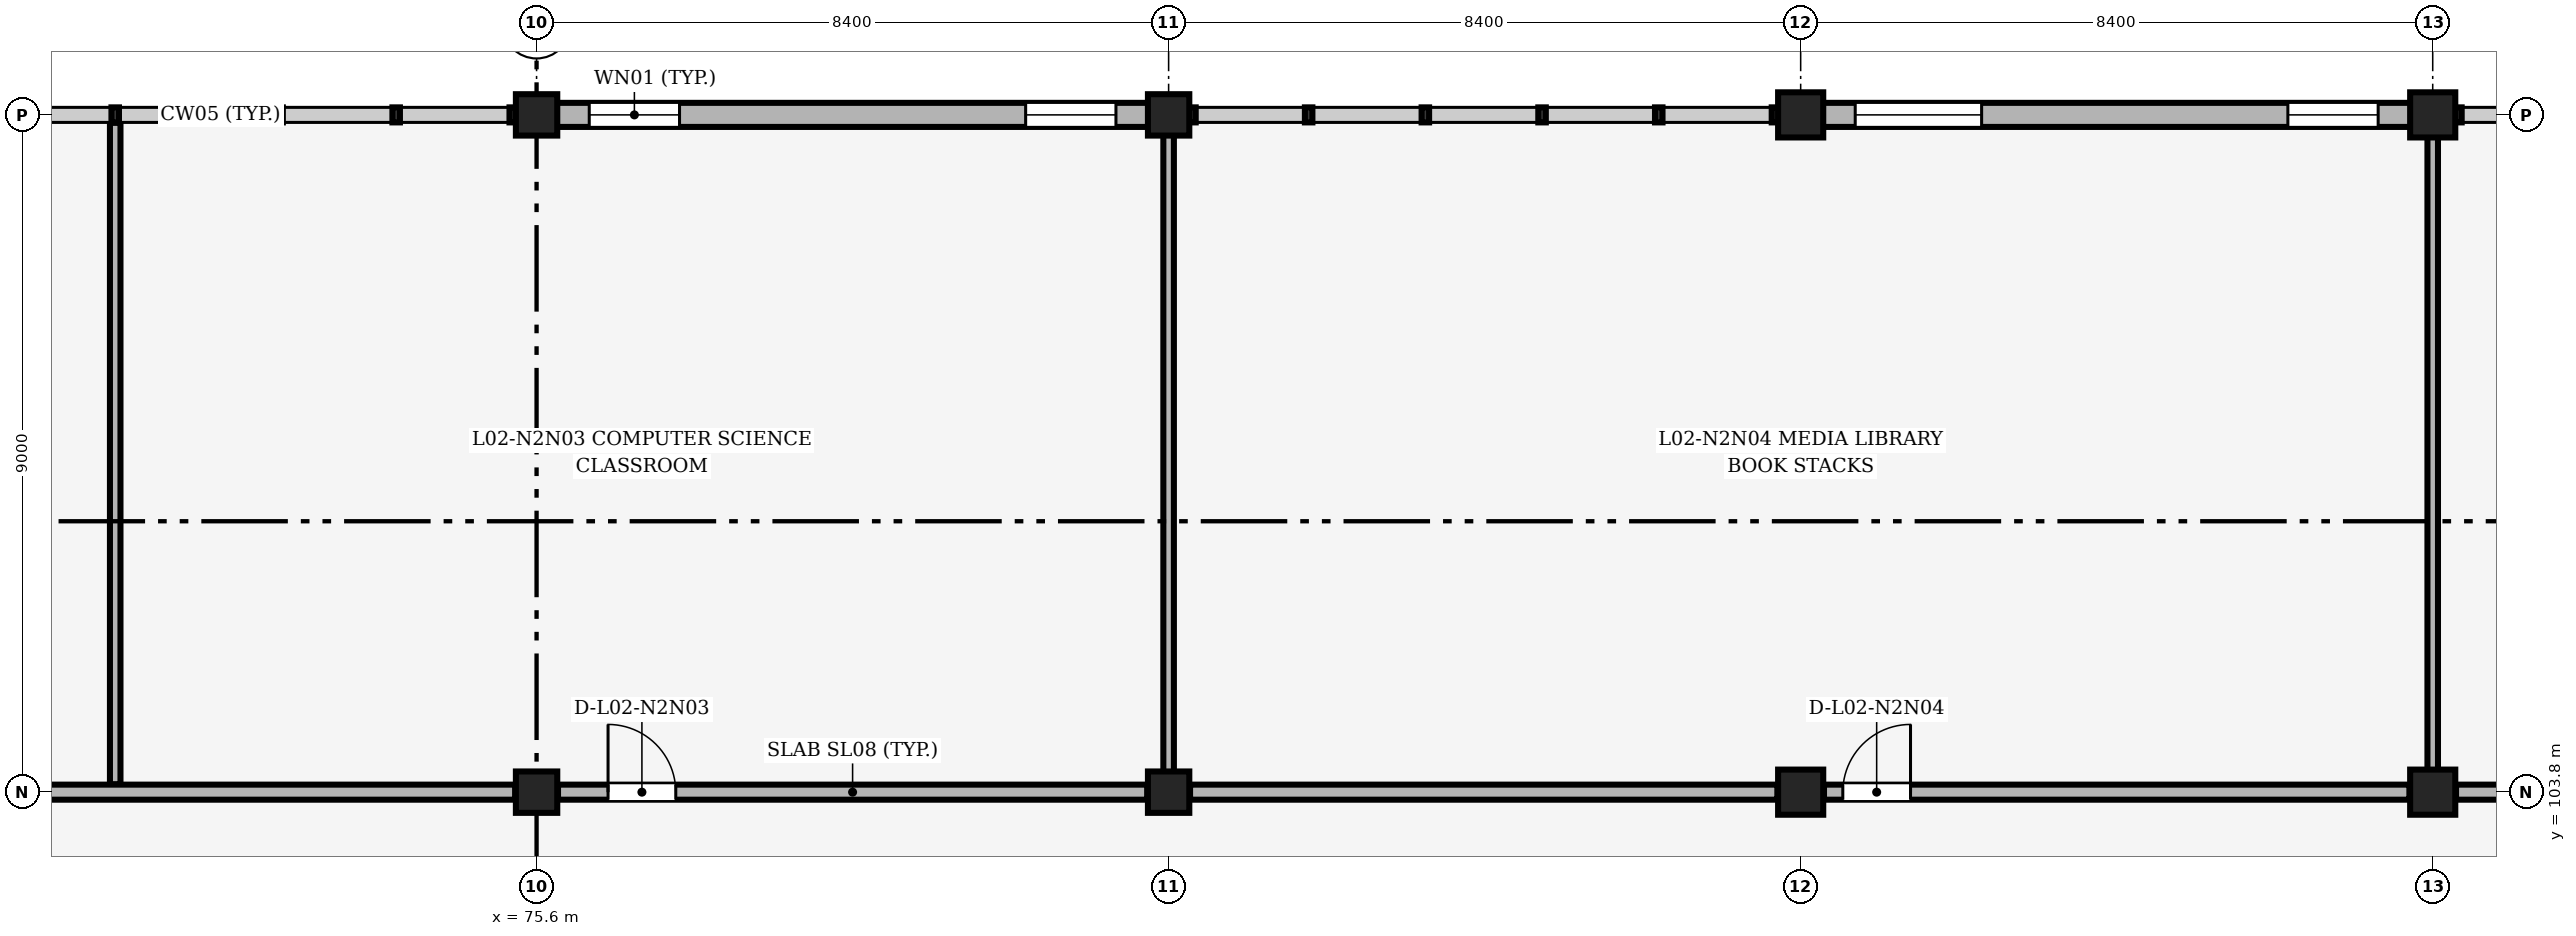
"""IFC4 building model, lengths in metres.
Left out: names, types, materials, properties, quantities, classifications, styles, units other than length and angle.
Written with IfcOpenShell. Run it as: python <this file> out.ifc"""

import sys

from ifc_helpers import new_model, si_unit, direction, frame, frame_2d, origin, origin_2d, place, context, subcontext, project, spatial, rectangle, extrude, element, fill, save


model = new_model("IFC4")
c1 = context("Model", 3, precision=1e-05, world=origin(), true_north=direction((0.0, 1.0)))
c2 = subcontext(c1, "Body", "Model", "MODEL_VIEW")
j1 = project(units=[si_unit("LENGTHUNIT", "METRE"), si_unit("PLANEANGLEUNIT", "RADIAN")], contexts=[c1])
p1 = place(None, origin())
s1 = spatial("IfcSite", under=j1, at=p1, CompositionType="ELEMENT")
p2 = place(p1, origin())
s2 = spatial("IfcBuilding", under=s1, at=p2, CompositionType="ELEMENT")
p3 = place(p2, frame((0.0, 0.0, 9.0)))
s3 = spatial("IfcBuildingStorey", under=s2, at=p3, CompositionType="ELEMENT", Elevation=9.0)
for number, where, z_axis, x_axis in (
    (1, (75.6, 103.8, 0.0), (0.0, 0.0, 1.0), (1.0, 0.0, 0.0)),
    (2, (75.6, 112.8, 0.0), (0.0, 0.0, 1.0), (1.0, 0.0, 0.0)),
    (3, (84.0, 103.8, 0.0), (0.0, 0.0, 1.0), (1.0, 0.0, 0.0)),
    (4, (84.0, 112.8, 0.0), (0.0, 0.0, 1.0), (1.0, 0.0, 0.0)),
):
    element("IfcColumn", number, at=place(p3, frame(where, z_axis=z_axis, x_axis=x_axis)), inside=s3, PredefinedType="COLUMN", context=c2, shape_type="SweptSolid", body=[
        extrude(rectangle(XDim=0.55, YDim=0.55, at=origin_2d()), origin(), (0.0, 0.0, 1.0), 4.2),
    ])
for number, where, z_axis, x_axis in (
    (5, (92.4, 103.8, 0.0), (0.0, 0.0, 1.0), (1.0, 0.0, 0.0)),
    (6, (92.4, 112.8, 0.0), (0.0, 0.0, 1.0), (1.0, 0.0, 0.0)),
    (7, (100.8, 103.8, 0.0), (0.0, 0.0, 1.0), (1.0, 0.0, 0.0)),
    (8, (100.8, 112.8, 0.0), (0.0, 0.0, 1.0), (1.0, 0.0, 0.0)),
):
    element("IfcColumn", number, at=place(p3, frame(where, z_axis=z_axis, x_axis=x_axis)), inside=s3, PredefinedType="COLUMN", context=c2, shape_type="SweptSolid", body=[
        extrude(rectangle(XDim=0.6, YDim=0.6, at=origin_2d()), origin(), (0.0, 0.0, 1.0), 4.2),
    ])
p4 = place(p3, frame((75.85, 112.8, 0.0), z_axis=(0.0, 0.0, 1.0), x_axis=(1.0, 0.0, 0.0)))
e9 = element("IfcWall", 9, at=p4, inside=s3, PredefinedType="SOLIDWALL", context=c2, shape_type="SweptSolid", body=[
    extrude(rectangle(XDim=7.9, YDim=0.32, at=frame_2d((3.95, 0.0))), origin(), (0.0, 0.0, 1.0), 3.26),
])
p5 = place(p4, frame((0.45, 0.0, 0.9)))
e10 = element("IfcOpeningElement", 10, at=p5, cuts=e9, PredefinedType="OPENING", context=c2, shape_type="SweptSolid", body=[
    extrude(rectangle(XDim=1.2, YDim=1.5, at=frame_2d((0.6, 0.75))), frame((0.0, 0.17, 0.0), z_axis=(0.0, -1.0, 0.0), x_axis=(1.0, 0.0, 0.0)), (0.0, 0.0, 1.0), 0.34),
])
p6 = place(p4, frame((6.25, 0.0, 0.9)))
e11 = element("IfcOpeningElement", 11, at=p6, cuts=e9, PredefinedType="OPENING", context=c2, shape_type="SweptSolid", body=[
    extrude(rectangle(XDim=1.2, YDim=1.8, at=frame_2d((0.6, 0.9))), frame((0.0, 0.17, 0.0), z_axis=(0.0, -1.0, 0.0), x_axis=(1.0, 0.0, 0.0)), (0.0, 0.0, 1.0), 0.34),
])
p7 = place(p3, frame((92.675, 112.8, 0.0), z_axis=(0.0, 0.0, 1.0), x_axis=(1.0, 0.0, 0.0)))
e12 = element("IfcWall", 12, at=p7, inside=s3, PredefinedType="SOLIDWALL", context=c2, shape_type="SweptSolid", body=[
    extrude(rectangle(XDim=7.85, YDim=0.32, at=frame_2d((3.925, 0.0))), origin(), (0.0, 0.0, 1.0), 3.26),
])
p8 = place(p7, frame((0.45, 0.0, 0.9)))
e13 = element("IfcOpeningElement", 13, at=p8, cuts=e12, PredefinedType="OPENING", context=c2, shape_type="SweptSolid", body=[
    extrude(rectangle(XDim=1.68, YDim=2.21, at=frame_2d((0.84, 1.105))), frame((0.0, 0.17, 0.0), z_axis=(0.0, -1.0, 0.0), x_axis=(1.0, 0.0, 0.0)), (0.0, 0.0, 1.0), 0.34),
])
p9 = place(p7, frame((6.2, 0.0, 0.9)))
e14 = element("IfcOpeningElement", 14, at=p9, cuts=e12, PredefinedType="OPENING", context=c2, shape_type="SweptSolid", body=[
    extrude(rectangle(XDim=1.2, YDim=1.5, at=frame_2d((0.6, 0.75))), frame((0.0, 0.17, 0.0), z_axis=(0.0, -1.0, 0.0), x_axis=(1.0, 0.0, 0.0)), (0.0, 0.0, 1.0), 0.34),
])
p10 = place(p3, frame((70.0, 103.905, 0.0), z_axis=(0.0, 0.0, 1.0), x_axis=(0.0, 1.0, 0.0)))
e15 = element("IfcWall", 15, at=p10, inside=s3, PredefinedType="PARTITIONING", context=c2, shape_type="SweptSolid", body=[
    extrude(rectangle(XDim=8.79, YDim=0.14, at=frame_2d((4.395, 0.0))), origin(), (0.0, 0.0, 1.0), 3.9),
])
p11 = place(p3, frame((84.0, 103.905, 0.0), z_axis=(0.0, 0.0, 1.0), x_axis=(0.0, 1.0, 0.0)))
e16 = element("IfcWall", 16, at=p11, inside=s3, PredefinedType="PARTITIONING", context=c2, shape_type="SweptSolid", body=[
    extrude(rectangle(XDim=8.73, YDim=0.14, at=frame_2d((4.365, 0.0))), origin(), (0.0, 0.0, 1.0), 3.11),
])
p12 = place(p3, frame((100.8, 103.905, 0.0), z_axis=(0.0, 0.0, 1.0), x_axis=(0.0, 1.0, 0.0)))
e17 = element("IfcWall", 17, at=p12, inside=s3, PredefinedType="PARTITIONING", context=c2, shape_type="SweptSolid", body=[
    extrude(rectangle(XDim=8.73, YDim=0.14, at=frame_2d((4.365, 0.0))), origin(), (0.0, 0.0, 1.0), 2.96),
])
p13 = place(p3, frame((67.485, 103.8, 0.0), z_axis=(0.0, 0.0, 1.0), x_axis=(1.0, 0.0, 0.0)))
e18 = element("IfcWall", 18, at=p13, inside=s3, PredefinedType="PARTITIONING", context=c2, shape_type="SweptSolid", body=[
    extrude(rectangle(XDim=7.83, YDim=0.2, at=frame_2d((3.915, 0.0))), origin(), (0.0, 0.0, 1.0), 3.11),
])
p14 = place(p3, frame((75.885, 103.8, 0.0), z_axis=(0.0, 0.0, 1.0), x_axis=(1.0, 0.0, 0.0)))
e19 = element("IfcWall", 19, at=p14, inside=s3, PredefinedType="PARTITIONING", context=c2, shape_type="SweptSolid", body=[
    extrude(rectangle(XDim=7.83, YDim=0.2, at=frame_2d((3.915, 0.0))), origin(), (0.0, 0.0, 1.0), 3.06),
])
p15 = place(p14, frame((0.665, 0.0, 0.0)))
e20 = element("IfcOpeningElement", 20, at=p15, cuts=e19, PredefinedType="OPENING", context=c2, shape_type="SweptSolid", body=[
    extrude(rectangle(XDim=0.9, YDim=2.1, at=frame_2d((0.45, 1.05))), frame((0.0, 0.11, 0.0), z_axis=(0.0, -1.0, 0.0), x_axis=(1.0, 0.0, 0.0)), (0.0, 0.0, 1.0), 0.22),
])
p16 = place(p3, frame((84.285, 103.8, 0.0), z_axis=(0.0, 0.0, 1.0), x_axis=(1.0, 0.0, 0.0)))
e21 = element("IfcWall", 21, at=p16, inside=s3, PredefinedType="PARTITIONING", context=c2, shape_type="SweptSolid", body=[
    extrude(rectangle(XDim=7.805, YDim=0.2, at=frame_2d((3.903, 0.0))), origin(), (0.0, 0.0, 1.0), 3.01),
])
p17 = place(p3, frame((92.71, 103.8, 0.0), z_axis=(0.0, 0.0, 1.0), x_axis=(1.0, 0.0, 0.0)))
e22 = element("IfcWall", 22, at=p17, inside=s3, PredefinedType="PARTITIONING", context=c2, shape_type="SweptSolid", body=[
    extrude(rectangle(XDim=7.78, YDim=0.2, at=frame_2d((3.89, 0.0))), origin(), (0.0, 0.0, 1.0), 3.01),
])
p18 = place(p17, frame((0.25, 0.0, 0.0)))
e23 = element("IfcOpeningElement", 23, at=p18, cuts=e22, PredefinedType="OPENING", context=c2, shape_type="SweptSolid", body=[
    extrude(rectangle(XDim=0.9, YDim=2.1, at=frame_2d((0.45, 1.05))), frame((0.0, 0.11, 0.0), z_axis=(0.0, -1.0, 0.0), x_axis=(1.0, 0.0, 0.0)), (0.0, 0.0, 1.0), 0.22),
])
p19 = place(p3, frame((101.11, 103.8, 0.0), z_axis=(0.0, 0.0, 1.0), x_axis=(1.0, 0.0, 0.0)))
e24 = element("IfcWall", 24, at=p19, inside=s3, PredefinedType="PARTITIONING", context=c2, shape_type="SweptSolid", body=[
    extrude(rectangle(XDim=7.78, YDim=0.2, at=frame_2d((3.89, 0.0))), origin(), (0.0, 0.0, 1.0), 2.96),
])
p20 = place(p19, frame((6.63, 0.0, 0.0)))
e25 = element("IfcOpeningElement", 25, at=p20, cuts=e24, PredefinedType="OPENING", context=c2, shape_type="SweptSolid", body=[
    extrude(rectangle(XDim=0.9, YDim=2.1, at=frame_2d((0.45, 1.05))), frame((0.0, 0.11, 0.0), z_axis=(0.0, -1.0, 0.0), x_axis=(1.0, 0.0, 0.0)), (0.0, 0.0, 1.0), 0.22),
])
p21 = place(p5, origin())
e26 = element("IfcWindow", 26, at=p21, inside=s3, PartitioningType="SINGLE_PANEL", PredefinedType="WINDOW", context=c2, shape_type="SweptSolid", body=[
    extrude(rectangle(XDim=1.2, YDim=1.5, at=frame_2d((0.6, 0.75))), frame((0.0, 0.03, 0.0), z_axis=(0.0, -1.0, 0.0), x_axis=(1.0, 0.0, 0.0)), (0.0, 0.0, 1.0), 0.06),
])
fill(e10, e26)
p22 = place(p6, origin())
e27 = element("IfcWindow", 27, at=p22, inside=s3, PartitioningType="SINGLE_PANEL", PredefinedType="WINDOW", context=c2, shape_type="SweptSolid", body=[
    extrude(rectangle(XDim=1.2, YDim=1.8, at=frame_2d((0.6, 0.9))), frame((0.0, 0.03, 0.0), z_axis=(0.0, -1.0, 0.0), x_axis=(1.0, 0.0, 0.0)), (0.0, 0.0, 1.0), 0.06),
])
fill(e11, e27)
p23 = place(p8, origin())
e28 = element("IfcWindow", 28, at=p23, inside=s3, PartitioningType="SINGLE_PANEL", PredefinedType="WINDOW", context=c2, shape_type="SweptSolid", body=[
    extrude(rectangle(XDim=1.68, YDim=2.21, at=frame_2d((0.84, 1.105))), frame((0.0, 0.03, 0.0), z_axis=(0.0, -1.0, 0.0), x_axis=(1.0, 0.0, 0.0)), (0.0, 0.0, 1.0), 0.06),
])
fill(e13, e28)
p24 = place(p9, origin())
e29 = element("IfcWindow", 29, at=p24, inside=s3, PartitioningType="SINGLE_PANEL", PredefinedType="WINDOW", context=c2, shape_type="SweptSolid", body=[
    extrude(rectangle(XDim=1.2, YDim=1.5, at=frame_2d((0.6, 0.75))), frame((0.0, 0.03, 0.0), z_axis=(0.0, -1.0, 0.0), x_axis=(1.0, 0.0, 0.0)), (0.0, 0.0, 1.0), 0.06),
])
fill(e14, e29)
p25 = place(p15, origin())
e30 = element("IfcDoor", 30, at=p25, inside=s3, OperationType="SINGLE_SWING_LEFT", PredefinedType="DOOR", context=c2, shape_type="SweptSolid", body=[
    extrude(rectangle(XDim=0.9, YDim=2.1, at=frame_2d((0.45, 1.05))), frame((0.0, 0.025, 0.0), z_axis=(0.0, -1.0, 0.0), x_axis=(1.0, 0.0, 0.0)), (0.0, 0.0, 1.0), 0.05),
])
fill(e20, e30)
p26 = place(p18, origin())
e31 = element("IfcDoor", 31, at=p26, inside=s3, OperationType="SINGLE_SWING_RIGHT", PredefinedType="DOOR", context=c2, shape_type="SweptSolid", body=[
    extrude(rectangle(XDim=0.9, YDim=2.1, at=frame_2d((0.45, 1.05))), frame((0.0, 0.025, 0.0), z_axis=(0.0, -1.0, 0.0), x_axis=(1.0, 0.0, 0.0)), (0.0, 0.0, 1.0), 0.05),
])
fill(e23, e31)
save(model, sys.argv[1])
